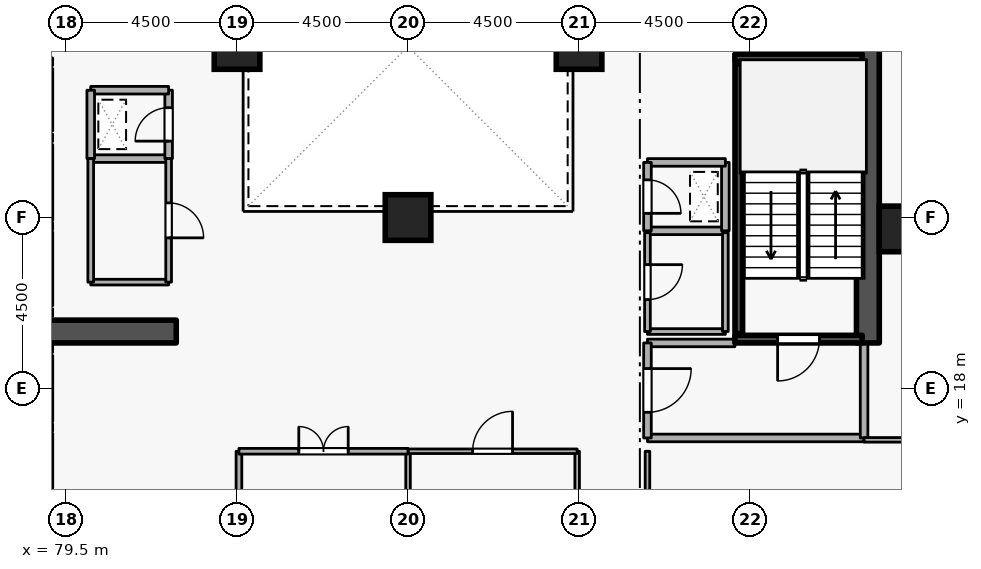
"""IFC4 building model, lengths in metres.
Left out: names, types, materials, properties, quantities, classifications, styles, units other than length and angle.
Written with IfcOpenShell. Run it as: python <this file> out.ifc"""

import sys

from ifc_helpers import new_model, si_unit, direction, frame, frame_2d, origin, origin_2d, place, context, subcontext, project, spatial, rectangle, extrude, element, fill, save


model = new_model("IFC4")
c1 = context("Model", 3, precision=1e-05, world=origin(), true_north=direction((0.0, 1.0)))
c2 = subcontext(c1, "Body", "Model", "MODEL_VIEW")
j1 = project(units=[si_unit("LENGTHUNIT", "METRE"), si_unit("PLANEANGLEUNIT", "RADIAN")], contexts=[c1])
p1 = place(None, origin())
s1 = spatial("IfcSite", under=j1, at=p1, CompositionType="ELEMENT")
p2 = place(p1, origin())
s2 = spatial("IfcBuilding", under=s1, at=p2, CompositionType="ELEMENT")
p3 = place(p2, frame((0.0, 0.0, 80.1)))
s3 = spatial("IfcBuildingStorey", under=s2, at=p3, CompositionType="ELEMENT", Elevation=80.1)
p4 = place(p3, frame((100.6, 19.2, 0.0), z_axis=(0.0, 0.0, 1.0), x_axis=(0.0, 1.0, 0.0)))
e1 = element("IfcWall", 1, at=p4, inside=s3, PredefinedType="SHEAR", context=c2, shape_type="SweptSolid", body=[
    extrude(rectangle(XDim=15.6, YDim=0.6, at=frame_2d((7.8, 0.0))), origin(), (0.0, 0.0, 1.0), 3.6),
])
p5 = place(p3, frame((76.7, 19.5, 0.0), z_axis=(0.0, 0.0, 1.0), x_axis=(1.0, 0.0, 0.0)))
e2 = element("IfcWall", 2, at=p5, inside=s3, PredefinedType="SHEAR", context=c2, shape_type="SweptSolid", body=[
    extrude(rectangle(XDim=5.7, YDim=0.6, at=frame_2d((2.85, 0.0))), origin(), (0.0, 0.0, 1.0), 3.6),
])
for number, where, z_axis, x_axis in (
    (3, (101.5, 22.2, 0.0), (0.0, 0.0, 1.0), (1.0, 0.0, 0.0)),
    (4, (93.0, 27.0, 0.0), (0.0, 0.0, 1.0), (1.0, 0.0, 0.0)),
    (5, (84.0, 27.0, 0.0), (0.0, 0.0, 1.0), (1.0, 0.0, 0.0)),
    (6, (88.5, 22.5, 0.0), (0.0, 0.0, 1.0), (1.0, 0.0, 0.0)),
):
    element("IfcColumn", number, at=place(p3, frame(where, z_axis=z_axis, x_axis=x_axis)), inside=s3, PredefinedType="COLUMN", context=c2, shape_type="SweptSolid", body=[
        extrude(rectangle(XDim=1.2, YDim=1.2, at=origin_2d()), origin(), (0.0, 0.0, 1.0), 3.6),
    ])
p6 = place(p3, frame((79.05, 24.78, 0.0), z_axis=(0.0, 0.0, 1.0), x_axis=(0.0, 1.0, 0.0)))
e7 = element("IfcWall", 7, at=p6, inside=s3, PredefinedType="STANDARD", context=c2, shape_type="SweptSolid", body=[
    extrude(rectangle(XDim=1.64, YDim=0.2, at=frame_2d((0.82, 0.0))), origin(), (0.0, 0.0, 1.0), 3.34),
])
p7 = place(p6, frame((0.31, 0.0, 0.0)))
e8 = element("IfcOpeningElement", 8, at=p7, cuts=e7, PredefinedType="OPENING", context=c2, shape_type="SweptSolid", body=[
    extrude(rectangle(XDim=1.02, YDim=2.06, at=frame_2d((0.51, 1.03))), frame((0.0, 0.11, 0.0), z_axis=(0.0, -1.0, 0.0), x_axis=(1.0, 0.0, 0.0)), (0.0, 0.0, 1.0), 0.22),
])
p8 = place(p3, frame((79.05, 22.43, 0.0), z_axis=(0.0, 0.0, 1.0), x_axis=(0.0, 1.0, 0.0)))
e9 = element("IfcWall", 9, at=p8, inside=s3, PredefinedType="STANDARD", context=c2, shape_type="SweptSolid", body=[
    extrude(rectangle(XDim=1.99, YDim=0.2, at=frame_2d((0.995, 0.0))), origin(), (0.0, 0.0, 1.0), 3.34),
])
p9 = place(p3, frame((79.05, 20.18, 0.0), z_axis=(0.0, 0.0, 1.0), x_axis=(0.0, 1.0, 0.0)))
e10 = element("IfcWall", 10, at=p9, inside=s3, PredefinedType="STANDARD", context=c2, shape_type="SweptSolid", body=[
    extrude(rectangle(XDim=1.94, YDim=0.2, at=frame_2d((0.97, 0.0))), origin(), (0.0, 0.0, 1.0), 3.34),
])
p10 = place(p3, frame((79.05, 17.13, 0.0), z_axis=(0.0, 0.0, 1.0), x_axis=(0.0, 1.0, 0.0)))
e11 = element("IfcWall", 11, at=p10, inside=s3, PredefinedType="STANDARD", context=c2, shape_type="SweptSolid", body=[
    extrude(rectangle(XDim=1.74, YDim=0.2, at=frame_2d((0.87, 0.0))), origin(), (0.0, 0.0, 1.0), 3.34),
])
p11 = place(p10, frame((0.36, 0.0, 0.0)))
e12 = element("IfcOpeningElement", 12, at=p11, cuts=e11, PredefinedType="OPENING", context=c2, shape_type="SweptSolid", body=[
    extrude(rectangle(XDim=1.02, YDim=2.06, at=frame_2d((0.51, 1.03))), frame((0.0, 0.11, 0.0), z_axis=(0.0, -1.0, 0.0), x_axis=(1.0, 0.0, 0.0)), (0.0, 0.0, 1.0), 0.22),
])
p12 = place(p3, frame((79.05, 15.03, 0.0), z_axis=(0.0, 0.0, 1.0), x_axis=(0.0, 1.0, 0.0)))
e13 = element("IfcWall", 13, at=p12, inside=s3, PredefinedType="STANDARD", context=c2, shape_type="SweptSolid", body=[
    extrude(rectangle(XDim=1.79, YDim=0.2, at=frame_2d((0.895, 0.0))), origin(), (0.0, 0.0, 1.0), 3.34),
])
p13 = place(p12, frame((0.385, 0.0, 0.0)))
e14 = element("IfcOpeningElement", 14, at=p13, cuts=e13, PredefinedType="OPENING", context=c2, shape_type="SweptSolid", body=[
    extrude(rectangle(XDim=1.02, YDim=2.06, at=frame_2d((0.51, 1.03))), frame((0.0, 0.11, 0.0), z_axis=(0.0, -1.0, 0.0), x_axis=(1.0, 0.0, 0.0)), (0.0, 0.0, 1.0), 0.22),
])
p14 = place(p3, frame((100.45, 19.3, 0.0), z_axis=(0.0, 0.0, 1.0), x_axis=(-1.0, 0.0, 0.0)))
e15 = element("IfcWall", 15, at=p14, inside=s3, PredefinedType="SHEAR", context=c2, shape_type="SweptSolid", body=[
    extrude(rectangle(XDim=3.35, YDim=0.2, at=frame_2d((1.675, 0.0))), origin(), (0.0, 0.0, 1.0), 3.6),
])
p15 = place(p14, frame((1.125, 0.0, 0.0)))
e16 = element("IfcOpeningElement", 16, at=p15, cuts=e15, PredefinedType="OPENING", context=c2, shape_type="SweptSolid", body=[
    extrude(rectangle(XDim=1.1, YDim=2.1, at=frame_2d((0.55, 1.05))), frame((0.0, 0.11, 0.0), z_axis=(0.0, -1.0, 0.0), x_axis=(1.0, 0.0, 0.0)), (0.0, 0.0, 1.0), 0.22),
])
p16 = place(p3, frame((97.1, 26.7, 0.0), z_axis=(0.0, 0.0, 1.0), x_axis=(1.0, 0.0, 0.0)))
e17 = element("IfcWall", 17, at=p16, inside=s3, PredefinedType="SHEAR", context=c2, shape_type="SweptSolid", body=[
    extrude(rectangle(XDim=3.35, YDim=0.2, at=frame_2d((1.675, 0.0))), origin(), (0.0, 0.0, 1.0), 3.6),
])
p17 = place(p3, frame((97.203, 26.55, 0.0), z_axis=(0.0, 0.0, 1.0), x_axis=(0.0, -1.0, 0.0)))
e18 = element("IfcWall", 18, at=p17, inside=s3, PredefinedType="SHEAR", context=c2, shape_type="SweptSolid", body=[
    extrude(rectangle(XDim=7.1, YDim=0.2, at=frame_2d((3.55, 0.0))), origin(), (0.0, 0.0, 1.0), 3.6),
])
p18 = place(p3, frame((94.8, 16.7, 0.0), z_axis=(0.0, 0.0, 1.0), x_axis=(1.0, 0.0, 0.0)))
e19 = element("IfcWall", 19, at=p18, inside=s3, PredefinedType="STANDARD", context=c2, shape_type="SweptSolid", body=[
    extrude(rectangle(XDim=5.7, YDim=0.2, at=frame_2d((2.85, 0.0))), origin(), (0.0, 0.0, 1.0), 3.34),
])
p19 = place(p3, frame((100.5, 16.7, 0.0), z_axis=(0.0, 0.0, 1.0), x_axis=(0.0, 1.0, 0.0)))
e20 = element("IfcWall", 20, at=p19, inside=s3, PredefinedType="STANDARD", context=c2, shape_type="SweptSolid", body=[
    extrude(rectangle(XDim=2.5, YDim=0.2, at=frame_2d((1.25, 0.0))), origin(), (0.0, 0.0, 1.0), 3.34),
])
p20 = place(p3, frame((97.1, 19.2, 0.0), z_axis=(0.0, 0.0, 1.0), x_axis=(-1.0, 0.0, 0.0)))
e21 = element("IfcWall", 21, at=p20, inside=s3, PredefinedType="STANDARD", context=c2, shape_type="SweptSolid", body=[
    extrude(rectangle(XDim=2.3, YDim=0.2, at=frame_2d((1.15, 0.0))), origin(), (0.0, 0.0, 1.0), 2.545),
])
p21 = place(p3, frame((94.8, 19.2, 0.0), z_axis=(0.0, 0.0, 1.0), x_axis=(0.0, -1.0, 0.0)))
e22 = element("IfcWall", 22, at=p21, inside=s3, PredefinedType="STANDARD", context=c2, shape_type="SweptSolid", body=[
    extrude(rectangle(XDim=2.5, YDim=0.2, at=frame_2d((1.25, 0.0))), origin(), (0.0, 0.0, 1.0), 3.34),
])
p22 = place(p21, frame((0.675, 0.0, 0.0)))
e23 = element("IfcOpeningElement", 23, at=p22, cuts=e22, PredefinedType="OPENING", context=c2, shape_type="SweptSolid", body=[
    extrude(rectangle(XDim=1.15, YDim=2.1, at=frame_2d((0.575, 1.05))), frame((0.0, 0.11, 0.0), z_axis=(0.0, -1.0, 0.0), x_axis=(1.0, 0.0, 0.0)), (0.0, 0.0, 1.0), 0.22),
])
p23 = place(p3, frame((94.8, 22.15, 0.0), z_axis=(0.0, 0.0, 1.0), x_axis=(1.0, 0.0, 0.0)))
e24 = element("IfcWall", 24, at=p23, inside=s3, PredefinedType="STANDARD", context=c2, shape_type="SweptSolid", body=[
    extrude(rectangle(XDim=2.05, YDim=0.2, at=frame_2d((1.025, 0.0))), origin(), (0.0, 0.0, 1.0), 3.34),
])
p24 = place(p3, frame((96.85, 22.15, 0.0), z_axis=(0.0, 0.0, 1.0), x_axis=(0.0, 1.0, 0.0)))
e25 = element("IfcWall", 25, at=p24, inside=s3, PredefinedType="STANDARD", context=c2, shape_type="SweptSolid", body=[
    extrude(rectangle(XDim=1.8, YDim=0.2, at=frame_2d((0.9, 0.0))), origin(), (0.0, 0.0, 1.0), 3.34),
])
p25 = place(p3, frame((96.85, 23.95, 0.0), z_axis=(0.0, 0.0, 1.0), x_axis=(-1.0, 0.0, 0.0)))
e26 = element("IfcWall", 26, at=p25, inside=s3, PredefinedType="STANDARD", context=c2, shape_type="SweptSolid", body=[
    extrude(rectangle(XDim=2.05, YDim=0.2, at=frame_2d((1.025, 0.0))), origin(), (0.0, 0.0, 1.0), 3.34),
])
p26 = place(p3, frame((94.8, 23.95, 0.0), z_axis=(0.0, 0.0, 1.0), x_axis=(0.0, -1.0, 0.0)))
e27 = element("IfcWall", 27, at=p26, inside=s3, PredefinedType="STANDARD", context=c2, shape_type="SweptSolid", body=[
    extrude(rectangle(XDim=1.8, YDim=0.2, at=frame_2d((0.9, 0.0))), origin(), (0.0, 0.0, 1.0), 3.34),
])
p27 = place(p26, frame((0.46, 0.0, 0.0)))
e28 = element("IfcOpeningElement", 28, at=p27, cuts=e27, PredefinedType="OPENING", context=c2, shape_type="SweptSolid", body=[
    extrude(rectangle(XDim=0.88, YDim=2.04, at=frame_2d((0.44, 1.02))), frame((0.0, 0.11, 0.0), z_axis=(0.0, -1.0, 0.0), x_axis=(1.0, 0.0, 0.0)), (0.0, 0.0, 1.0), 0.22),
])
p28 = place(p3, frame((80.15, 24.05, 0.0), z_axis=(0.0, 0.0, 1.0), x_axis=(1.0, 0.0, 0.0)))
e29 = element("IfcWall", 29, at=p28, inside=s3, PredefinedType="STANDARD", context=c2, shape_type="SweptSolid", body=[
    extrude(rectangle(XDim=2.05, YDim=0.2, at=frame_2d((1.025, 0.0))), origin(), (0.0, 0.0, 1.0), 3.34),
])
p29 = place(p3, frame((82.2, 24.05, 0.0), z_axis=(0.0, 0.0, 1.0), x_axis=(0.0, 1.0, 0.0)))
e30 = element("IfcWall", 30, at=p29, inside=s3, PredefinedType="STANDARD", context=c2, shape_type="SweptSolid", body=[
    extrude(rectangle(XDim=1.8, YDim=0.2, at=frame_2d((0.9, 0.0))), origin(), (0.0, 0.0, 1.0), 3.34),
])
p30 = place(p29, frame((0.46, 0.0, 0.0)))
e31 = element("IfcOpeningElement", 31, at=p30, cuts=e30, PredefinedType="OPENING", context=c2, shape_type="SweptSolid", body=[
    extrude(rectangle(XDim=0.88, YDim=2.04, at=frame_2d((0.44, 1.02))), frame((0.0, 0.11, 0.0), z_axis=(0.0, -1.0, 0.0), x_axis=(1.0, 0.0, 0.0)), (0.0, 0.0, 1.0), 0.22),
])
p31 = place(p3, frame((82.2, 25.85, 0.0), z_axis=(0.0, 0.0, 1.0), x_axis=(-1.0, 0.0, 0.0)))
e32 = element("IfcWall", 32, at=p31, inside=s3, PredefinedType="STANDARD", context=c2, shape_type="SweptSolid", body=[
    extrude(rectangle(XDim=2.05, YDim=0.2, at=frame_2d((1.025, 0.0))), origin(), (0.0, 0.0, 1.0), 3.34),
])
p32 = place(p3, frame((80.15, 25.85, 0.0), z_axis=(0.0, 0.0, 1.0), x_axis=(0.0, -1.0, 0.0)))
e33 = element("IfcWall", 33, at=p32, inside=s3, PredefinedType="STANDARD", context=c2, shape_type="SweptSolid", body=[
    extrude(rectangle(XDim=1.8, YDim=0.2, at=frame_2d((0.9, 0.0))), origin(), (0.0, 0.0, 1.0), 3.34),
])
p33 = place(p3, frame((94.8, 19.5, 0.0), z_axis=(0.0, 0.0, 1.0), x_axis=(1.0, 0.0, 0.0)))
e34 = element("IfcWall", 34, at=p33, inside=s3, PredefinedType="PARTITIONING", context=c2, shape_type="SweptSolid", body=[
    extrude(rectangle(XDim=2.05, YDim=0.15, at=frame_2d((1.025, 0.0))), origin(), (0.0, 0.0, 1.0), 2.545),
])
p34 = place(p3, frame((96.85, 19.5, 0.0), z_axis=(0.0, 0.0, 1.0), x_axis=(0.0, 1.0, 0.0)))
e35 = element("IfcWall", 35, at=p34, inside=s3, PredefinedType="PARTITIONING", context=c2, shape_type="SweptSolid", body=[
    extrude(rectangle(XDim=2.6, YDim=0.15, at=frame_2d((1.3, 0.0))), origin(), (0.0, 0.0, 1.0), 3.34),
])
p35 = place(p3, frame((94.8, 22.1, 0.0), z_axis=(0.0, 0.0, 1.0), x_axis=(0.0, -1.0, 0.0)))
e36 = element("IfcWall", 36, at=p35, inside=s3, PredefinedType="PARTITIONING", context=c2, shape_type="SweptSolid", body=[
    extrude(rectangle(XDim=2.6, YDim=0.15, at=frame_2d((1.3, 0.0))), origin(), (0.0, 0.0, 1.0), 3.34),
])
p36 = place(p35, frame((0.84, 0.0, 0.0)))
e37 = element("IfcOpeningElement", 37, at=p36, cuts=e36, PredefinedType="OPENING", context=c2, shape_type="SweptSolid", body=[
    extrude(rectangle(XDim=0.92, YDim=2.08, at=frame_2d((0.46, 1.04))), frame((0.0, 0.085, 0.0), z_axis=(0.0, -1.0, 0.0), x_axis=(1.0, 0.0, 0.0)), (0.0, 0.0, 1.0), 0.17),
])
p37 = place(p3, frame((82.2, 20.8, 0.0), z_axis=(0.0, 0.0, 1.0), x_axis=(-1.0, 0.0, 0.0)))
e38 = element("IfcWall", 38, at=p37, inside=s3, PredefinedType="PARTITIONING", context=c2, shape_type="SweptSolid", body=[
    extrude(rectangle(XDim=2.05, YDim=0.15, at=frame_2d((1.025, 0.0))), origin(), (0.0, 0.0, 1.0), 3.34),
])
p38 = place(p3, frame((80.15, 20.8, 0.0), z_axis=(0.0, 0.0, 1.0), x_axis=(0.0, 1.0, 0.0)))
e39 = element("IfcWall", 39, at=p38, inside=s3, PredefinedType="PARTITIONING", context=c2, shape_type="SweptSolid", body=[
    extrude(rectangle(XDim=3.25, YDim=0.15, at=frame_2d((1.625, 0.0))), origin(), (0.0, 0.0, 1.0), 3.34),
])
p39 = place(p3, frame((82.2, 24.05, 0.0), z_axis=(0.0, 0.0, 1.0), x_axis=(0.0, -1.0, 0.0)))
e40 = element("IfcWall", 40, at=p39, inside=s3, PredefinedType="PARTITIONING", context=c2, shape_type="SweptSolid", body=[
    extrude(rectangle(XDim=3.25, YDim=0.15, at=frame_2d((1.625, 0.0))), origin(), (0.0, 0.0, 1.0), 3.34),
])
p40 = place(p39, frame((1.165, 0.0, 0.0)))
e41 = element("IfcOpeningElement", 41, at=p40, cuts=e40, PredefinedType="OPENING", context=c2, shape_type="SweptSolid", body=[
    extrude(rectangle(XDim=0.92, YDim=2.08, at=frame_2d((0.46, 1.04))), frame((0.0, 0.085, 0.0), z_axis=(0.0, -1.0, 0.0), x_axis=(1.0, 0.0, 0.0)), (0.0, 0.0, 1.0), 0.17),
])
for number, where, z_axis, x_axis in (
    (42, (92.95, 16.35, 0.0), (0.0, 0.0, 1.0), (0.0, -1.0, 0.0)),
    (43, (94.8, 14.75, 0.0), (0.0, 0.0, 1.0), (0.0, 1.0, 0.0)),
):
    element("IfcWall", number, at=place(p3, frame(where, z_axis=z_axis, x_axis=x_axis)), inside=s3, PredefinedType="PARTITIONING", context=c2, shape_type="SweptSolid", body=[
        extrude(rectangle(XDim=1.6, YDim=0.12, at=frame_2d((0.8, 0.0))), origin(), (0.0, 0.0, 1.0), 3.34),
    ])
p41 = place(p3, frame((100.5, 16.65, 0.0), z_axis=(0.0, 0.0, 1.0), x_axis=(1.0, 0.0, 0.0)))
e44 = element("IfcWall", 44, at=p41, inside=s3, PredefinedType="PARTITIONING", context=c2, shape_type="SweptSolid", body=[
    extrude(rectangle(XDim=5.92, YDim=0.12, at=frame_2d((2.96, 0.0))), origin(), (0.0, 0.0, 1.0), 3.34),
])
p42 = place(p3, frame((88.5, 9.08, 0.0), z_axis=(0.0, 0.0, 1.0), x_axis=(0.0, 1.0, 0.0)))
e45 = element("IfcWall", 45, at=p42, inside=s3, PredefinedType="PARTITIONING", context=c2, shape_type="SweptSolid", body=[
    extrude(rectangle(XDim=7.27, YDim=0.12, at=frame_2d((3.635, 0.0))), origin(), (0.0, 0.0, 1.0), 2.882),
])
p43 = place(p3, frame((88.5, 16.35, 0.0), z_axis=(0.0, 0.0, 1.0), x_axis=(1.0, 0.0, 0.0)))
e46 = element("IfcWall", 46, at=p43, inside=s3, PredefinedType="PARTITIONING", context=c2, shape_type="SweptSolid", body=[
    extrude(rectangle(XDim=4.45, YDim=0.12, at=frame_2d((2.225, 0.0))), origin(), (0.0, 0.0, 1.0), 3.34),
])
p44 = place(p43, frame((1.7, 0.0, 0.0)))
e47 = element("IfcOpeningElement", 47, at=p44, cuts=e46, PredefinedType="OPENING", context=c2, shape_type="SweptSolid", body=[
    extrude(rectangle(XDim=1.05, YDim=2.1, at=frame_2d((0.525, 1.05))), frame((0.0, 0.07, 0.0), z_axis=(0.0, -1.0, 0.0), x_axis=(1.0, 0.0, 0.0)), (0.0, 0.0, 1.0), 0.14),
])
p45 = place(p3, frame((84.05, 14.75, 0.0), z_axis=(0.0, 0.0, 1.0), x_axis=(0.0, 1.0, 0.0)))
e48 = element("IfcWall", 48, at=p45, inside=s3, PredefinedType="PARTITIONING", context=c2, shape_type="SweptSolid", body=[
    extrude(rectangle(XDim=1.6, YDim=0.15, at=frame_2d((0.8, 0.0))), origin(), (0.0, 0.0, 1.0), 3.34),
])
p46 = place(p3, frame((84.05, 16.35, 0.0), z_axis=(0.0, 0.0, 1.0), x_axis=(1.0, 0.0, 0.0)))
e49 = element("IfcWall", 49, at=p46, inside=s3, PredefinedType="PARTITIONING", context=c2, shape_type="SweptSolid", body=[
    extrude(rectangle(XDim=4.45, YDim=0.15, at=frame_2d((2.225, 0.0))), origin(), (0.0, 0.0, 1.0), 3.34),
])
p47 = place(p46, frame((1.575, 0.0, 0.0)))
e50 = element("IfcOpeningElement", 50, at=p47, cuts=e49, PredefinedType="OPENING", context=c2, shape_type="SweptSolid", body=[
    extrude(rectangle(XDim=1.3, YDim=2.12, at=frame_2d((0.65, 1.06))), frame((0.0, 0.085, 0.0), z_axis=(0.0, -1.0, 0.0), x_axis=(1.0, 0.0, 0.0)), (0.0, 0.0, 1.0), 0.17),
])
p48 = place(p15, origin())
e51 = element("IfcDoor", 51, at=p48, inside=s3, OperationType="SINGLE_SWING_RIGHT", PredefinedType="DOOR", context=c2, shape_type="SweptSolid", body=[
    extrude(rectangle(XDim=1.1, YDim=2.1, at=frame_2d((0.55, 1.05))), frame((0.0, 0.025, 0.0), z_axis=(0.0, -1.0, 0.0), x_axis=(1.0, 0.0, 0.0)), (0.0, 0.0, 1.0), 0.05),
])
fill(e16, e51)
p49 = place(p22, origin())
e52 = element("IfcDoor", 52, at=p49, inside=s3, OperationType="SINGLE_SWING_LEFT", PredefinedType="DOOR", context=c2, shape_type="SweptSolid", body=[
    extrude(rectangle(XDim=1.15, YDim=2.1, at=frame_2d((0.575, 1.05))), frame((0.0, 0.025, 0.0), z_axis=(0.0, -1.0, 0.0), x_axis=(1.0, 0.0, 0.0)), (0.0, 0.0, 1.0), 0.05),
])
fill(e23, e52)
p50 = place(p27, origin())
e53 = element("IfcDoor", 53, at=p50, inside=s3, OperationType="SINGLE_SWING_RIGHT", PredefinedType="DOOR", context=c2, shape_type="SweptSolid", body=[
    extrude(rectangle(XDim=0.88, YDim=2.04, at=frame_2d((0.44, 1.02))), frame((0.0, 0.025, 0.0), z_axis=(0.0, -1.0, 0.0), x_axis=(1.0, 0.0, 0.0)), (0.0, 0.0, 1.0), 0.05),
])
fill(e28, e53)
p51 = place(p30, origin())
e54 = element("IfcDoor", 54, at=p51, inside=s3, OperationType="SINGLE_SWING_LEFT", PredefinedType="DOOR", context=c2, shape_type="SweptSolid", body=[
    extrude(rectangle(XDim=0.88, YDim=2.04, at=frame_2d((0.44, 1.02))), frame((0.0, 0.025, 0.0), z_axis=(0.0, -1.0, 0.0), x_axis=(1.0, 0.0, 0.0)), (0.0, 0.0, 1.0), 0.05),
])
fill(e31, e54)
p52 = place(p36, origin())
e55 = element("IfcDoor", 55, at=p52, inside=s3, OperationType="SINGLE_SWING_LEFT", PredefinedType="DOOR", context=c2, shape_type="SweptSolid", body=[
    extrude(rectangle(XDim=0.92, YDim=2.08, at=frame_2d((0.46, 1.04))), frame((0.0, 0.025, 0.0), z_axis=(0.0, -1.0, 0.0), x_axis=(1.0, 0.0, 0.0)), (0.0, 0.0, 1.0), 0.05),
])
fill(e37, e55)
p53 = place(p40, origin())
e56 = element("IfcDoor", 56, at=p53, inside=s3, OperationType="SINGLE_SWING_RIGHT", PredefinedType="DOOR", context=c2, shape_type="SweptSolid", body=[
    extrude(rectangle(XDim=0.92, YDim=2.08, at=frame_2d((0.46, 1.04))), frame((0.0, 0.025, 0.0), z_axis=(0.0, -1.0, 0.0), x_axis=(1.0, 0.0, 0.0)), (0.0, 0.0, 1.0), 0.05),
])
fill(e41, e56)
p54 = place(p44, origin())
e57 = element("IfcDoor", 57, at=p54, inside=s3, OperationType="SINGLE_SWING_RIGHT", PredefinedType="DOOR", context=c2, shape_type="SweptSolid", body=[
    extrude(rectangle(XDim=1.05, YDim=2.1, at=frame_2d((0.525, 1.05))), frame((0.0, 0.025, 0.0), z_axis=(0.0, -1.0, 0.0), x_axis=(1.0, 0.0, 0.0)), (0.0, 0.0, 1.0), 0.05),
])
fill(e47, e57)
p55 = place(p47, origin())
e58 = element("IfcDoor", 58, at=p55, inside=s3, OperationType="DOUBLE_DOOR_SINGLE_SWING", PredefinedType="DOOR", context=c2, shape_type="SweptSolid", body=[
    extrude(rectangle(XDim=1.3, YDim=2.12, at=frame_2d((0.65, 1.06))), frame((0.0, 0.025, 0.0), z_axis=(0.0, -1.0, 0.0), x_axis=(1.0, 0.0, 0.0)), (0.0, 0.0, 1.0), 0.05),
])
fill(e50, e58)
save(model, sys.argv[1])
